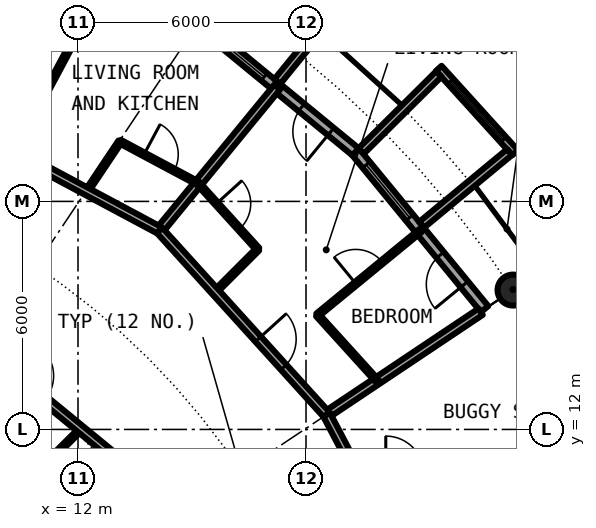
"""IFC4 building model, lengths in metres.
Left out: names, types, materials, properties, quantities, classifications, styles, units other than length and angle.
Written with IfcOpenShell. Run it as: python <this file> out.ifc"""

import sys

from ifc_helpers import new_model, si_unit, direction, frame, frame_2d, origin, origin_2d, place, context, subcontext, project, spatial, rectangle, circle, hollow_circle, extrude, element, fill, save


model = new_model("IFC4")
c1 = context("Model", 3, precision=1e-05, world=origin(), true_north=direction((0.0, 1.0)))
c2 = subcontext(c1, "Body", "Model", "MODEL_VIEW")
j1 = project(units=[si_unit("LENGTHUNIT", "METRE"), si_unit("PLANEANGLEUNIT", "RADIAN")], contexts=[c1])
p1 = place(None, origin())
s1 = spatial("IfcSite", under=j1, at=p1, CompositionType="ELEMENT")
p2 = place(p1, origin())
s2 = spatial("IfcBuilding", under=s1, at=p2, CompositionType="ELEMENT")
p3 = place(p2, frame((0.0, 0.0, 212.7)))
s3 = spatial("IfcBuildingStorey", under=s2, at=p3, CompositionType="ELEMENT", Elevation=212.7)
p4 = place(p3, frame((23.448, 15.667, 0.0), z_axis=(0.0, 0.0, 1.0), x_axis=(1.0, 0.0, 0.0)))
e1 = element("IfcColumn", 1, at=p4, inside=s3, PredefinedType="COLUMN", context=c2, shape_type="SweptSolid", body=[
    extrude(hollow_circle(Radius=0.406, WallThickness=0.03, at=origin_2d()), origin(), (0.0, 0.0, 1.0), 3.05),
])
p5 = place(p3, frame((22.699, 15.167, 0.0), z_axis=(0.0, 0.0, 1.0), x_axis=(-0.634382322723, 0.773019449054, 0.0)))
e2 = element("IfcWall", 2, at=p5, inside=s3, PredefinedType="SOLIDWALL", context=c2, shape_type="SweptSolid", body=[
    extrude(rectangle(XDim=5.352, YDim=0.25, at=frame_2d((2.676, 0.0))), origin(), (0.0, 0.0, 1.0), 2.7),
])
p6 = place(p5, frame((0.841, 0.0, 0.0)))
e3 = element("IfcOpeningElement", 3, at=p6, cuts=e2, PredefinedType="OPENING", context=c2, shape_type="SweptSolid", body=[
    extrude(rectangle(XDim=1.0, YDim=2.2, at=frame_2d((0.5, 1.1))), frame((0.0, 0.135, 0.0), z_axis=(0.0, -1.0, 0.0), x_axis=(1.0, 0.0, 0.0)), (0.0, 0.0, 1.0), 0.27),
])
p7 = place(p5, frame((3.111, 0.0, 0.3)))
e4 = element("IfcOpeningElement", 4, at=p7, cuts=e2, PredefinedType="OPENING", context=c2, shape_type="SweptSolid", body=[
    extrude(rectangle(XDim=1.8, YDim=2.1, at=frame_2d((0.9, 1.05))), frame((0.0, 0.135, 0.0), z_axis=(0.0, -1.0, 0.0), x_axis=(1.0, 0.0, 0.0)), (0.0, 0.0, 1.0), 0.27),
])
p8 = place(p3, frame((23.503, 19.282, -0.03), z_axis=(0.0, 0.0, 1.0), x_axis=(-0.671506829416, 0.740998365753, 0.0)))
e5 = element("IfcWall", 5, at=p8, inside=s3, PredefinedType="SOLIDWALL", context=c2, shape_type="SweptSolid", body=[
    extrude(rectangle(XDim=2.993, YDim=0.2, at=frame_2d((1.497, 0.0))), origin(), (0.0, 0.0, 1.0), 2.73),
])
p9 = place(p8, frame((0.457, 0.0, 0.33)))
e6 = element("IfcOpeningElement", 6, at=p9, cuts=e5, PredefinedType="OPENING", context=c2, shape_type="SweptSolid", body=[
    extrude(circle(Radius=1.04, at=frame_2d((1.04, 1.04))), frame((0.0, 0.11, 0.0), z_axis=(0.0, -1.0, 0.0), x_axis=(1.0, 0.0, 0.0)), (0.0, 0.0, 1.0), 0.22),
])
p10 = place(p3, frame((21.041, 17.384, -0.03), z_axis=(0.0, 0.0, 1.0), x_axis=(0.770784861449, 0.63709551667, 0.0)))
e7 = element("IfcWall", 7, at=p10, inside=s3, PredefinedType="SOLIDWALL", context=c2, shape_type="SweptSolid", body=[
    extrude(rectangle(XDim=3.006, YDim=0.2, at=frame_2d((1.503, 0.0))), origin(), (0.0, 0.0, 1.0), 2.73),
])
p11 = place(p3, frame((19.45, 19.323, -0.03), z_axis=(0.0, 0.0, 1.0), x_axis=(0.709727076896, 0.704476739375, 0.0)))
e8 = element("IfcWall", 8, at=p11, inside=s3, PredefinedType="SOLIDWALL", context=c2, shape_type="SweptSolid", body=[
    extrude(rectangle(XDim=2.883, YDim=0.2, at=frame_2d((1.441, 0.0))), origin(), (0.0, 0.0, 1.0), 2.73),
])
p12 = place(p3, frame((19.304, 19.304, 0.0), z_axis=(0.0, 0.0, 1.0), x_axis=(-0.773019449054, 0.634382322723, 0.0)))
e9 = element("IfcWall", 9, at=p12, inside=s3, PredefinedType="SOLIDWALL", context=c2, shape_type="SweptSolid", body=[
    extrude(rectangle(XDim=5.352, YDim=0.25, at=frame_2d((2.676, 0.0))), origin(), (0.0, 0.0, 1.0), 2.7),
])
p13 = place(p12, frame((0.841, 0.0, 0.0)))
e10 = element("IfcOpeningElement", 10, at=p13, cuts=e9, PredefinedType="OPENING", context=c2, shape_type="SweptSolid", body=[
    extrude(rectangle(XDim=1.0, YDim=2.2, at=frame_2d((0.5, 1.1))), frame((0.0, 0.135, 0.0), z_axis=(0.0, -1.0, 0.0), x_axis=(1.0, 0.0, 0.0)), (0.0, 0.0, 1.0), 0.27),
])
p14 = place(p12, frame((3.111, 0.0, 0.3)))
e11 = element("IfcOpeningElement", 11, at=p14, cuts=e9, PredefinedType="OPENING", context=c2, shape_type="SweptSolid", body=[
    extrude(rectangle(XDim=1.8, YDim=2.1, at=frame_2d((0.9, 1.05))), frame((0.0, 0.135, 0.0), z_axis=(0.0, -1.0, 0.0), x_axis=(1.0, 0.0, 0.0)), (0.0, 0.0, 1.0), 0.27),
])
p15 = place(p3, frame((17.246, 21.155, -0.03), z_axis=(0.0, 0.0, 1.0), x_axis=(0.631741648902, 0.775179004516, 0.0)))
e12 = element("IfcWall", 12, at=p15, inside=s3, PredefinedType="SOLIDWALL", context=c2, shape_type="SweptSolid", body=[
    extrude(rectangle(XDim=3.006, YDim=0.2, at=frame_2d((1.503, 0.0))), origin(), (0.0, 0.0, 1.0), 2.73),
])
p16 = place(p3, frame((9.097, 9.05, 0.0), z_axis=(0.0, 0.0, 1.0), x_axis=(0.708909651863, 0.705299302067, 0.0)))
e13 = element("IfcWall", 13, at=p16, inside=s3, PredefinedType="PARTITIONING", context=c2, shape_type="SweptSolid", body=[
    extrude(rectangle(XDim=4.193, YDim=0.1, at=frame_2d((2.096, 0.0))), origin(), (0.0, 0.0, 1.0), 2.7),
])
p17 = place(p16, frame((1.646, 0.0, 0.0)))
e14 = element("IfcOpeningElement", 14, at=p17, cuts=e13, PredefinedType="OPENING", context=c2, shape_type="SweptSolid", body=[
    extrude(rectangle(XDim=0.9, YDim=2.3, at=frame_2d((0.45, 1.15))), frame((0.0, 0.06, 0.0), z_axis=(0.0, -1.0, 0.0), x_axis=(1.0, 0.0, 0.0)), (0.0, 0.0, 1.0), 0.12),
])
p18 = place(p3, frame((11.05, 20.673, 0.0), z_axis=(0.0, 0.0, 1.0), x_axis=(0.471372010014, 0.881934480659, 0.0)))
e15 = element("IfcWall", 15, at=p18, inside=s3, PredefinedType="PARTITIONING", context=c2, shape_type="SweptSolid", body=[
    extrude(rectangle(XDim=3.734, YDim=0.1, at=frame_2d((1.867, 0.0))), origin(), (0.0, 0.0, 1.0), 2.7),
])
p19 = place(p18, frame((1.417, 0.0, 0.0)))
e16 = element("IfcOpeningElement", 16, at=p19, cuts=e15, PredefinedType="OPENING", context=c2, shape_type="SweptSolid", body=[
    extrude(rectangle(XDim=0.9, YDim=2.3, at=frame_2d((0.45, 1.15))), frame((0.0, 0.06, 0.0), z_axis=(0.0, -1.0, 0.0), x_axis=(1.0, 0.0, 0.0)), (0.0, 0.0, 1.0), 0.12),
])
p20 = place(p3, frame((12.229, 18.264, 0.0), z_axis=(0.0, 0.0, 1.0), x_axis=(0.556271671389, 0.83100049796, 0.0)))
e17 = element("IfcWall", 17, at=p20, inside=s3, PredefinedType="PARTITIONING", context=c2, shape_type="SweptSolid", body=[
    extrude(rectangle(XDim=1.576, YDim=0.1, at=frame_2d((0.788, 0.0))), origin(), (0.0, 0.0, 1.0), 2.7),
])
p21 = place(p3, frame((14.147, 17.238, 0.0), z_axis=(0.0, 0.0, 1.0), x_axis=(0.634374159378, 0.773026148273, 0.0)))
e18 = element("IfcWall", 18, at=p21, inside=s3, PredefinedType="PARTITIONING", context=c2, shape_type="SweptSolid", body=[
    extrude(rectangle(XDim=4.876, YDim=0.2, at=frame_2d((2.438, 0.0))), origin(), (0.0, 0.0, 1.0), 2.7),
])
p22 = place(p3, frame((15.612, 15.622, 0.0), z_axis=(0.0, 0.0, 1.0), x_axis=(0.70679853939, 0.707414888673, 0.0)))
e19 = element("IfcWall", 19, at=p22, inside=s3, PredefinedType="PARTITIONING", context=c2, shape_type="SweptSolid", body=[
    extrude(rectangle(XDim=1.584, YDim=0.1, at=frame_2d((0.792, 0.0))), origin(), (0.0, 0.0, 1.0), 2.7),
])
p23 = place(p3, frame((18.302, 15.01, 0.0), z_axis=(0.0, 0.0, 1.0), x_axis=(0.773165322764, 0.634204528267, 0.0)))
e20 = element("IfcWall", 20, at=p23, inside=s3, PredefinedType="PARTITIONING", context=c2, shape_type="SweptSolid", body=[
    extrude(rectangle(XDim=3.505, YDim=0.1, at=frame_2d((1.752, 0.0))), origin(), (0.0, 0.0, 1.0), 2.7),
])
p24 = place(p23, frame((1.303, 0.0, 0.0)))
e21 = element("IfcOpeningElement", 21, at=p24, cuts=e20, PredefinedType="OPENING", context=c2, shape_type="SweptSolid", body=[
    extrude(rectangle(XDim=0.9, YDim=2.3, at=frame_2d((0.45, 1.15))), frame((0.0, 0.06, 0.0), z_axis=(0.0, -1.0, 0.0), x_axis=(1.0, 0.0, 0.0)), (0.0, 0.0, 1.0), 0.12),
])
p25 = place(p3, frame((18.542, 12.389, 0.0), z_axis=(0.0, 0.0, 1.0), x_axis=(0.831387096605, 0.55569370664, 0.0)))
e22 = element("IfcWall", 22, at=p25, inside=s3, PredefinedType="PARTITIONING", context=c2, shape_type="SweptSolid", body=[
    extrude(rectangle(XDim=4.875, YDim=0.2, at=frame_2d((2.438, 0.0))), origin(), (0.0, 0.0, 1.0), 2.7),
])
p26 = place(p3, frame((6.773, 16.353, 0.0), z_axis=(0.0, 0.0, 1.0), x_axis=(0.773034536097, -0.634363938131, 0.0)))
e23 = element("IfcWall", 23, at=p26, inside=s3, PredefinedType="PARTITIONING", context=c2, shape_type="SweptSolid", body=[
    extrude(rectangle(XDim=10.277, YDim=0.2, at=frame_2d((5.138, 0.0))), origin(), (0.0, 0.0, 1.0), 2.7),
])
p27 = place(p26, frame((4.638, 0.0, 0.0)))
e24 = element("IfcOpeningElement", 24, at=p27, cuts=e23, PredefinedType="OPENING", context=c2, shape_type="SweptSolid", body=[
    extrude(rectangle(XDim=1.0, YDim=2.3, at=frame_2d((0.5, 1.15))), frame((0.0, 0.11, 0.0), z_axis=(0.0, -1.0, 0.0), x_axis=(1.0, 0.0, 0.0)), (0.0, 0.0, 1.0), 0.22),
])
p28 = place(p3, frame((6.473, 21.34, 0.0), z_axis=(0.0, 0.0, 1.0), x_axis=(0.881912965532, -0.471412262491, 0.0)))
e25 = element("IfcWall", 25, at=p28, inside=s3, PredefinedType="PARTITIONING", context=c2, shape_type="SweptSolid", body=[
    extrude(rectangle(XDim=8.702, YDim=0.2, at=frame_2d((4.351, 0.0))), origin(), (0.0, 0.0, 1.0), 2.7),
])
p29 = place(p28, frame((2.764, 0.0, 0.0)))
e26 = element("IfcOpeningElement", 26, at=p29, cuts=e25, PredefinedType="OPENING", context=c2, shape_type="SweptSolid", body=[
    extrude(rectangle(XDim=1.0, YDim=2.3, at=frame_2d((0.5, 1.15))), frame((0.0, 0.11, 0.0), z_axis=(0.0, -1.0, 0.0), x_axis=(1.0, 0.0, 0.0)), (0.0, 0.0, 1.0), 0.22),
])
p30 = place(p3, frame((14.147, 17.238, 0.0), z_axis=(0.0, 0.0, 1.0), x_axis=(0.671561669125, -0.740948665268, 0.0)))
e27 = element("IfcWall", 27, at=p30, inside=s3, PredefinedType="PARTITIONING", context=c2, shape_type="SweptSolid", body=[
    extrude(rectangle(XDim=6.544, YDim=0.2, at=frame_2d((3.272, 0.0))), origin(), (0.0, 0.0, 1.0), 2.7),
])
p31 = place(p30, frame((3.862, 0.0, 0.0)))
e28 = element("IfcOpeningElement", 28, at=p31, cuts=e27, PredefinedType="OPENING", context=c2, shape_type="SweptSolid", body=[
    extrude(rectangle(XDim=1.0, YDim=2.3, at=frame_2d((0.5, 1.15))), frame((0.0, 0.11, 0.0), z_axis=(0.0, -1.0, 0.0), x_axis=(1.0, 0.0, 0.0)), (0.0, 0.0, 1.0), 0.22),
])
p32 = place(p3, frame((18.542, 12.389, 0.0), z_axis=(0.0, 0.0, 1.0), x_axis=(0.465359652486, -0.885121683068, 0.0)))
e29 = element("IfcWall", 29, at=p32, inside=s3, PredefinedType="PARTITIONING", context=c2, shape_type="SweptSolid", body=[
    extrude(rectangle(XDim=1.665, YDim=0.2, at=frame_2d((0.833, 0.0))), origin(), (0.0, 0.0, 1.0), 2.7),
])
p33 = place(p3, frame((13.106, 19.574, 0.0), z_axis=(0.0, 0.0, 1.0), x_axis=(0.881949682246, -0.471343566824, 0.0)))
e30 = element("IfcWall", 30, at=p33, inside=s3, PredefinedType="PARTITIONING", context=c2, shape_type="SweptSolid", body=[
    extrude(rectangle(XDim=2.331, YDim=0.1, at=frame_2d((1.166, 0.0))), origin(), (0.0, 0.0, 1.0), 2.7),
])
p34 = place(p33, frame((0.716, 0.0, 0.0)))
e31 = element("IfcOpeningElement", 31, at=p34, cuts=e30, PredefinedType="OPENING", context=c2, shape_type="SweptSolid", body=[
    extrude(rectangle(XDim=0.9, YDim=2.3, at=frame_2d((0.45, 1.15))), frame((0.0, 0.06, 0.0), z_axis=(0.0, -1.0, 0.0), x_axis=(1.0, 0.0, 0.0)), (0.0, 0.0, 1.0), 0.12),
])
p35 = place(p3, frame((15.162, 18.475, 0.0), z_axis=(0.0, 0.0, 1.0), x_axis=(0.671528384412, -0.740978831634, 0.0)))
e32 = element("IfcWall", 32, at=p35, inside=s3, PredefinedType="PARTITIONING", context=c2, shape_type="SweptSolid", body=[
    extrude(rectangle(XDim=2.338, YDim=0.1, at=frame_2d((1.169, 0.0))), origin(), (0.0, 0.0, 1.0), 2.7),
])
p36 = place(p35, frame((0.719, 0.0, 0.0)))
e33 = element("IfcOpeningElement", 33, at=p36, cuts=e32, PredefinedType="OPENING", context=c2, shape_type="SweptSolid", body=[
    extrude(rectangle(XDim=0.9, YDim=2.3, at=frame_2d((0.45, 1.15))), frame((0.0, 0.06, 0.0), z_axis=(0.0, -1.0, 0.0), x_axis=(1.0, 0.0, 0.0)), (0.0, 0.0, 1.0), 0.12),
])
p37 = place(p3, frame((18.302, 15.01, 0.0), z_axis=(0.0, 0.0, 1.0), x_axis=(0.671637685376, -0.740879760544, 0.0)))
e34 = element("IfcWall", 34, at=p37, inside=s3, PredefinedType="PARTITIONING", context=c2, shape_type="SweptSolid", body=[
    extrude(rectangle(XDim=2.338, YDim=0.1, at=frame_2d((1.169, 0.0))), origin(), (0.0, 0.0, 1.0), 2.7),
])
p38 = place(p6, origin())
e35 = element("IfcDoor", 35, at=p38, inside=s3, OperationType="SINGLE_SWING_LEFT", PredefinedType="DOOR", context=c2, shape_type="SweptSolid", body=[
    extrude(rectangle(XDim=1.0, YDim=2.2, at=frame_2d((0.5, 1.1))), frame((0.0, 0.025, 0.0), z_axis=(0.0, -1.0, 0.0), x_axis=(1.0, 0.0, 0.0)), (0.0, 0.0, 1.0), 0.05),
])
fill(e3, e35)
p39 = place(p7, origin())
e36 = element("IfcWindow", 36, at=p39, inside=s3, PartitioningType="SINGLE_PANEL", PredefinedType="WINDOW", context=c2, shape_type="SweptSolid", body=[
    extrude(rectangle(XDim=1.8, YDim=2.1, at=frame_2d((0.9, 1.05))), frame((0.0, 0.03, 0.0), z_axis=(0.0, -1.0, 0.0), x_axis=(1.0, 0.0, 0.0)), (0.0, 0.0, 1.0), 0.06),
])
fill(e4, e36)
p40 = place(p9, origin())
e37 = element("IfcWindow", 37, at=p40, inside=s3, PartitioningType="SINGLE_PANEL", PredefinedType="WINDOW", context=c2, shape_type="SweptSolid", body=[
    extrude(circle(Radius=1.04, at=frame_2d((1.04, 1.04))), frame((0.0, 0.03, 0.0), z_axis=(0.0, -1.0, 0.0), x_axis=(1.0, 0.0, 0.0)), (0.0, 0.0, 1.0), 0.06),
])
fill(e6, e37)
p41 = place(p13, origin())
e38 = element("IfcDoor", 38, at=p41, inside=s3, OperationType="SINGLE_SWING_LEFT", PredefinedType="DOOR", context=c2, shape_type="SweptSolid", body=[
    extrude(rectangle(XDim=1.0, YDim=2.2, at=frame_2d((0.5, 1.1))), frame((0.0, 0.025, 0.0), z_axis=(0.0, -1.0, 0.0), x_axis=(1.0, 0.0, 0.0)), (0.0, 0.0, 1.0), 0.05),
])
fill(e10, e38)
p42 = place(p14, origin())
e39 = element("IfcWindow", 39, at=p42, inside=s3, PartitioningType="SINGLE_PANEL", PredefinedType="WINDOW", context=c2, shape_type="SweptSolid", body=[
    extrude(rectangle(XDim=1.8, YDim=2.1, at=frame_2d((0.9, 1.05))), frame((0.0, 0.03, 0.0), z_axis=(0.0, -1.0, 0.0), x_axis=(1.0, 0.0, 0.0)), (0.0, 0.0, 1.0), 0.06),
])
fill(e11, e39)
p43 = place(p31, origin())
e40 = element("IfcDoor", 40, at=p43, inside=s3, OperationType="SINGLE_SWING_RIGHT", PredefinedType="DOOR", context=c2, shape_type="SweptSolid", body=[
    extrude(rectangle(XDim=1.0, YDim=2.3, at=frame_2d((0.5, 1.15))), frame((0.0, 0.025, 0.0), z_axis=(0.0, -1.0, 0.0), x_axis=(1.0, 0.0, 0.0)), (0.0, 0.0, 1.0), 0.05),
])
fill(e28, e40)
p44 = place(p36, origin())
e41 = element("IfcDoor", 41, at=p44, inside=s3, OperationType="SINGLE_SWING_LEFT", PredefinedType="DOOR", context=c2, shape_type="SweptSolid", body=[
    extrude(rectangle(XDim=0.9, YDim=2.3, at=frame_2d((0.45, 1.15))), frame((0.0, 0.025, 0.0), z_axis=(0.0, -1.0, 0.0), x_axis=(1.0, 0.0, 0.0)), (0.0, 0.0, 1.0), 0.05),
])
fill(e33, e41)
p45 = place(p24, origin())
e42 = element("IfcDoor", 42, at=p45, inside=s3, OperationType="SINGLE_SWING_RIGHT", PredefinedType="DOOR", context=c2, shape_type="SweptSolid", body=[
    extrude(rectangle(XDim=0.9, YDim=2.3, at=frame_2d((0.45, 1.15))), frame((0.0, 0.025, 0.0), z_axis=(0.0, -1.0, 0.0), x_axis=(1.0, 0.0, 0.0)), (0.0, 0.0, 1.0), 0.05),
])
fill(e21, e42)
p46 = place(p34, origin())
e43 = element("IfcDoor", 43, at=p46, inside=s3, OperationType="SINGLE_SWING_LEFT", PredefinedType="DOOR", context=c2, shape_type="SweptSolid", body=[
    extrude(rectangle(XDim=0.9, YDim=2.3, at=frame_2d((0.45, 1.15))), frame((0.0, 0.025, 0.0), z_axis=(0.0, -1.0, 0.0), x_axis=(1.0, 0.0, 0.0)), (0.0, 0.0, 1.0), 0.05),
])
fill(e31, e43)
p47 = place(p19, origin())
e44 = element("IfcDoor", 44, at=p47, inside=s3, OperationType="SINGLE_SWING_LEFT", PredefinedType="DOOR", context=c2, shape_type="SweptSolid", body=[
    extrude(rectangle(XDim=0.9, YDim=2.3, at=frame_2d((0.45, 1.15))), frame((0.0, 0.025, 0.0), z_axis=(0.0, -1.0, 0.0), x_axis=(1.0, 0.0, 0.0)), (0.0, 0.0, 1.0), 0.05),
])
fill(e16, e44)
save(model, sys.argv[1])
